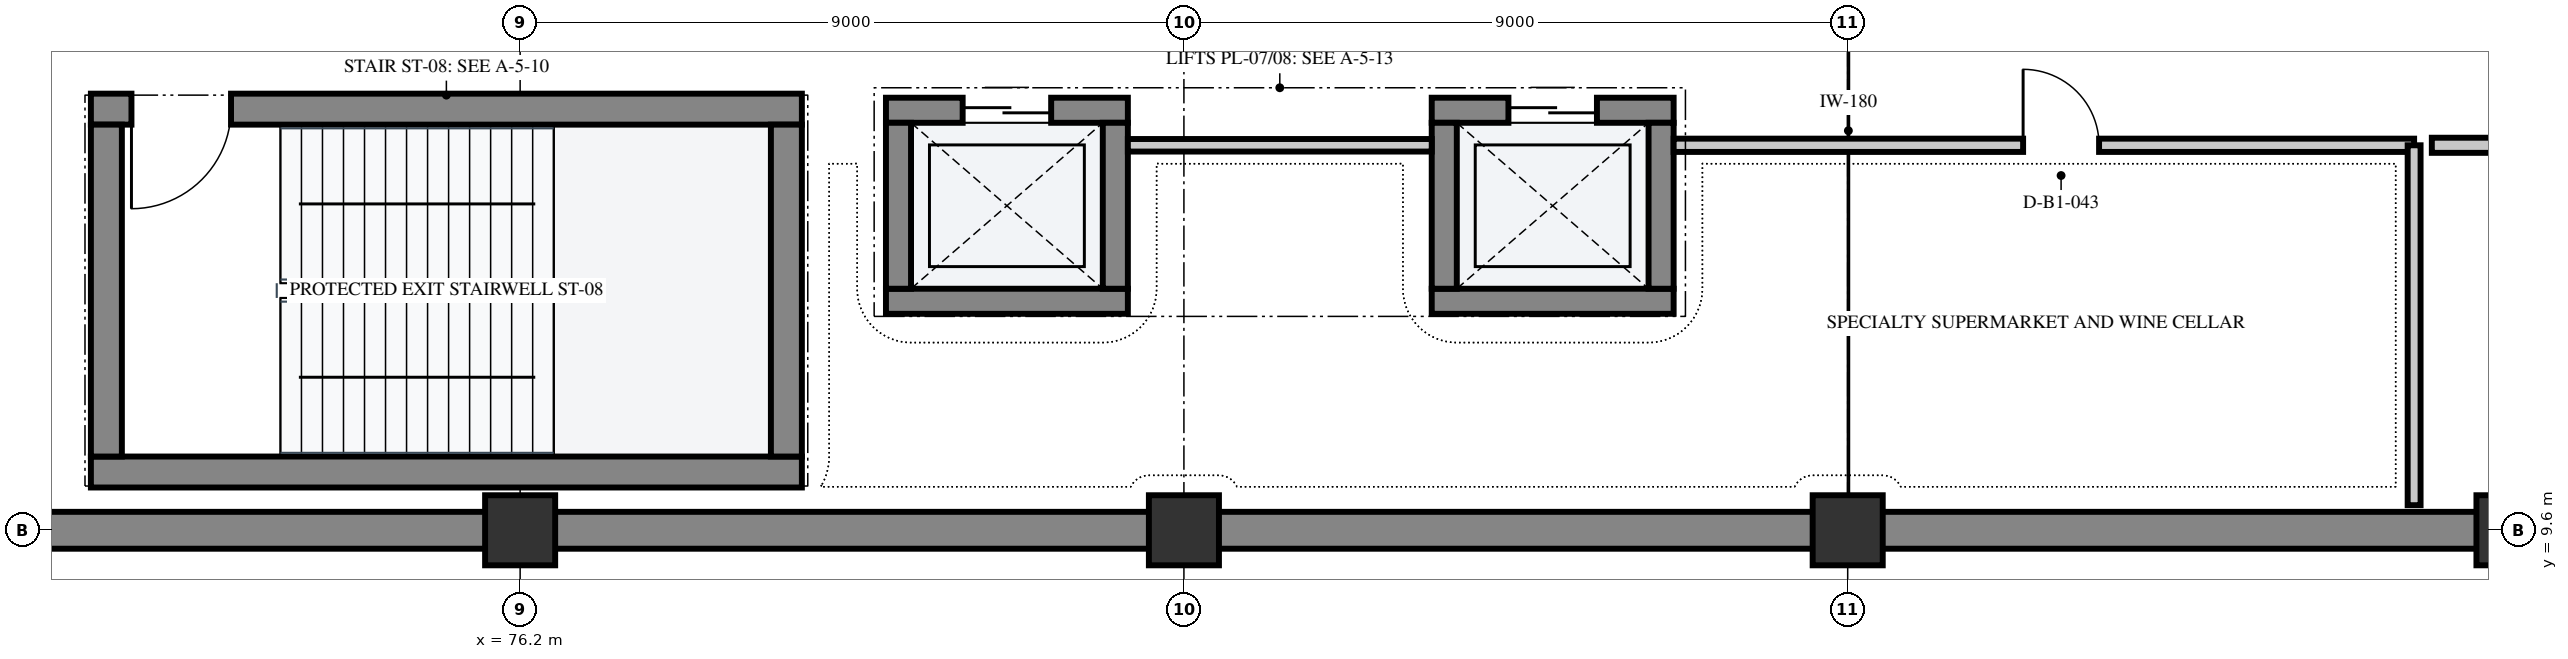
"""IFC4 building model, lengths in metres.
Left out: names, types, materials, properties, quantities, classifications, styles, units other than length and angle.
Written with IfcOpenShell. Run it as: python <this file> out.ifc"""

import sys

from ifc_helpers import new_model, si_unit, direction, frame, frame_2d, origin, origin_2d, place, context, subcontext, project, spatial, rectangle, extrude, element, fill, save


model = new_model("IFC4")
c1 = context("Model", 3, precision=1e-05, world=origin(), true_north=direction((0.0, 1.0)))
c2 = subcontext(c1, "Body", "Model", "MODEL_VIEW")
j1 = project(units=[si_unit("LENGTHUNIT", "METRE"), si_unit("PLANEANGLEUNIT", "RADIAN")], contexts=[c1])
p1 = place(None, origin())
s1 = spatial("IfcSite", under=j1, at=p1, CompositionType="ELEMENT")
p2 = place(p1, origin())
s2 = spatial("IfcBuilding", under=s1, at=p2, CompositionType="ELEMENT")
p3 = place(p2, frame((0.0, 0.0, -4.8)))
s3 = spatial("IfcBuildingStorey", under=s2, at=p3, CompositionType="ELEMENT", Elevation=-4.8)
for number, where, z_axis, x_axis in (
    (1, (85.2, 9.6, 0.0), (0.0, 0.0, 1.0), (1.0, 0.0, 0.0)),
    (2, (94.2, 9.6, 0.0), (0.0, 0.0, 1.0), (1.0, 0.0, 0.0)),
    (3, (103.2, 9.6, 0.0), (0.0, 0.0, 1.0), (1.0, 0.0, 0.0)),
    (4, (76.2, 9.6, 0.0), (0.0, 0.0, 1.0), (1.0, 0.0, 0.0)),
):
    element("IfcColumn", number, at=place(p3, frame(where, z_axis=z_axis, x_axis=x_axis)), inside=s3, PredefinedType="COLUMN", context=c2, shape_type="SweptSolid", body=[
        extrude(rectangle(XDim=0.95, YDim=0.95, at=origin_2d()), origin(), (0.0, 0.0, 1.0), 4.8),
    ])
p4 = place(p3, frame((106.2, 9.6, 0.0), z_axis=(0.0, 0.0, 1.0), x_axis=(-1.0, 0.0, 0.0)))
e5 = element("IfcWall", 5, at=p4, inside=s3, PredefinedType="USERDEFINED", context=c2, shape_type="SweptSolid", body=[
    extrude(rectangle(XDim=39.0, YDim=0.5, at=frame_2d((19.5, 0.0))), origin(), (0.0, 0.0, 1.0), 4.5),
])
p5 = place(p3, frame((70.38, 10.39, 0.0), z_axis=(0.0, 0.0, 1.0), x_axis=(1.0, 0.0, 0.0)))
e6 = element("IfcWall", 6, at=p5, inside=s3, PredefinedType="SHEAR", context=c2, shape_type="SweptSolid", body=[
    extrude(rectangle(XDim=9.64, YDim=0.42, at=frame_2d((4.82, 0.0))), origin(), (0.0, 0.0, 1.0), 4.5),
])
p6 = place(p3, frame((70.38, 15.31, 0.0), z_axis=(0.0, 0.0, 1.0), x_axis=(1.0, 0.0, 0.0)))
e7 = element("IfcWall", 7, at=p6, inside=s3, PredefinedType="SHEAR", context=c2, shape_type="SweptSolid", body=[
    extrude(rectangle(XDim=9.64, YDim=0.42, at=frame_2d((4.82, 0.0))), origin(), (0.0, 0.0, 1.0), 4.5),
])
p7 = place(p6, frame((0.55, 0.0, 0.0)))
e8 = element("IfcOpeningElement", 8, at=p7, cuts=e7, PredefinedType="OPENING", context=c2, shape_type="SweptSolid", body=[
    extrude(rectangle(XDim=1.35, YDim=2.2, at=frame_2d((0.675, 1.1))), frame((0.0, 0.222, 0.0), z_axis=(0.0, -1.0, 0.0), x_axis=(1.0, 0.0, 0.0)), (0.0, 0.0, 1.0), 0.444),
])
for number, where, z_axis, x_axis in (
    (9, (79.81, 10.6, 0.0), (0.0, 0.0, 1.0), (0.0, 1.0, 0.0)),
    (10, (70.59, 10.6, 0.0), (0.0, 0.0, 1.0), (0.0, 1.0, 0.0)),
):
    element("IfcWall", number, at=place(p3, frame(where, z_axis=z_axis, x_axis=x_axis)), inside=s3, PredefinedType="SHEAR", context=c2, shape_type="SweptSolid", body=[
        extrude(rectangle(XDim=4.5, YDim=0.42, at=frame_2d((2.25, 0.0))), origin(), (0.0, 0.0, 1.0), 4.5),
    ])
p8 = place(p3, frame((81.16, 12.705, 0.0), z_axis=(0.0, 0.0, 1.0), x_axis=(1.0, 0.0, 0.0)))
e11 = element("IfcWall", 11, at=p8, inside=s3, PredefinedType="SHEAR", context=c2, shape_type="SweptSolid", body=[
    extrude(rectangle(XDim=3.28, YDim=0.34, at=frame_2d((1.64, 0.0))), origin(), (0.0, 0.0, 1.0), 4.5),
])
p9 = place(p3, frame((81.16, 15.295, 0.0), z_axis=(0.0, 0.0, 1.0), x_axis=(1.0, 0.0, 0.0)))
e12 = element("IfcWall", 12, at=p9, inside=s3, PredefinedType="SHEAR", context=c2, shape_type="SweptSolid", body=[
    extrude(rectangle(XDim=3.28, YDim=0.34, at=frame_2d((1.64, 0.0))), origin(), (0.0, 0.0, 1.0), 4.5),
])
p10 = place(p9, frame((1.04, 0.0, 0.0)))
e13 = element("IfcOpeningElement", 13, at=p10, cuts=e12, PredefinedType="OPENING", context=c2, shape_type="SweptSolid", body=[
    extrude(rectangle(XDim=1.2, YDim=2.2, at=frame_2d((0.6, 1.1))), frame((0.0, 0.182, 0.0), z_axis=(0.0, -1.0, 0.0), x_axis=(1.0, 0.0, 0.0)), (0.0, 0.0, 1.0), 0.364),
])
for number, where, z_axis, x_axis in (
    (14, (81.33, 12.875, 0.0), (0.0, 0.0, 1.0), (0.0, 1.0, 0.0)),
    (15, (84.27, 12.875, 0.0), (0.0, 0.0, 1.0), (0.0, 1.0, 0.0)),
):
    element("IfcWall", number, at=place(p3, frame(where, z_axis=z_axis, x_axis=x_axis)), inside=s3, PredefinedType="SHEAR", context=c2, shape_type="SweptSolid", body=[
        extrude(rectangle(XDim=2.25, YDim=0.34, at=frame_2d((1.125, 0.0))), origin(), (0.0, 0.0, 1.0), 4.5),
    ])
p11 = place(p3, frame((88.56, 12.705, 0.0), z_axis=(0.0, 0.0, 1.0), x_axis=(1.0, 0.0, 0.0)))
e16 = element("IfcWall", 16, at=p11, inside=s3, PredefinedType="SHEAR", context=c2, shape_type="SweptSolid", body=[
    extrude(rectangle(XDim=3.28, YDim=0.34, at=frame_2d((1.64, 0.0))), origin(), (0.0, 0.0, 1.0), 4.5),
])
p12 = place(p3, frame((88.56, 15.295, 0.0), z_axis=(0.0, 0.0, 1.0), x_axis=(1.0, 0.0, 0.0)))
e17 = element("IfcWall", 17, at=p12, inside=s3, PredefinedType="SHEAR", context=c2, shape_type="SweptSolid", body=[
    extrude(rectangle(XDim=3.28, YDim=0.34, at=frame_2d((1.64, 0.0))), origin(), (0.0, 0.0, 1.0), 4.5),
])
p13 = place(p12, frame((1.04, 0.0, 0.0)))
e18 = element("IfcOpeningElement", 18, at=p13, cuts=e17, PredefinedType="OPENING", context=c2, shape_type="SweptSolid", body=[
    extrude(rectangle(XDim=1.2, YDim=2.2, at=frame_2d((0.6, 1.1))), frame((0.0, 0.182, 0.0), z_axis=(0.0, -1.0, 0.0), x_axis=(1.0, 0.0, 0.0)), (0.0, 0.0, 1.0), 0.364),
])
for number, where, z_axis, x_axis in (
    (19, (88.73, 12.875, 0.0), (0.0, 0.0, 1.0), (0.0, 1.0, 0.0)),
    (20, (91.67, 12.875, 0.0), (0.0, 0.0, 1.0), (0.0, 1.0, 0.0)),
):
    element("IfcWall", number, at=place(p3, frame(where, z_axis=z_axis, x_axis=x_axis)), inside=s3, PredefinedType="SHEAR", context=c2, shape_type="SweptSolid", body=[
        extrude(rectangle(XDim=2.25, YDim=0.34, at=frame_2d((1.125, 0.0))), origin(), (0.0, 0.0, 1.0), 4.5),
    ])
p14 = place(p3, frame((91.84, 14.82, 0.0), z_axis=(0.0, 0.0, 1.0), x_axis=(1.0, 0.0, 0.0)))
e21 = element("IfcWall", 21, at=p14, inside=s3, PredefinedType="PARTITIONING", context=c2, shape_type="SweptSolid", body=[
    extrude(rectangle(XDim=10.04, YDim=0.18, at=frame_2d((5.02, 0.0))), origin(), (0.0, 0.0, 1.0), 3.44),
])
p15 = place(p14, frame((4.738, 0.0, 0.0)))
e22 = element("IfcOpeningElement", 22, at=p15, cuts=e21, PredefinedType="OPENING", context=c2, shape_type="SweptSolid", body=[
    extrude(rectangle(XDim=1.03, YDim=2.16, at=frame_2d((0.515, 1.08))), frame((0.0, 0.102, 0.0), z_axis=(0.0, -1.0, 0.0), x_axis=(1.0, 0.0, 0.0)), (0.0, 0.0, 1.0), 0.204),
])
p16 = place(p3, frame((101.88, 14.82, 0.0), z_axis=(0.0, 0.0, 1.0), x_axis=(0.0, -1.0, 0.0)))
e23 = element("IfcWall", 23, at=p16, inside=s3, PredefinedType="PARTITIONING", context=c2, shape_type="SweptSolid", body=[
    extrude(rectangle(XDim=4.88, YDim=0.175, at=frame_2d((2.44, 0.0))), origin(), (0.0, 0.0, 1.0), 4.5),
])
p17 = place(p3, frame((84.44, 14.82, 0.0), z_axis=(0.0, 0.0, 1.0), x_axis=(1.0, 0.0, 0.0)))
e24 = element("IfcWall", 24, at=p17, inside=s3, PredefinedType="PARTITIONING", context=c2, shape_type="SweptSolid", body=[
    extrude(rectangle(XDim=4.12, YDim=0.17, at=frame_2d((2.06, 0.0))), origin(), (0.0, 0.0, 1.0), 3.44),
])
p18 = place(p3, frame((102.12, 14.82, 0.0), z_axis=(0.0, 0.0, 1.0), x_axis=(1.0, 0.0, 0.0)))
e25 = element("IfcWall", 25, at=p18, inside=s3, PredefinedType="PARTITIONING", context=c2, shape_type="SweptSolid", body=[
    extrude(rectangle(XDim=14.959, YDim=0.205, at=frame_2d((7.479, 0.0))), origin(), (0.0, 0.0, 1.0), 3.44),
])
p19 = place(p18, frame((7.005, 0.0, 0.0)))
e26 = element("IfcOpeningElement", 26, at=p19, cuts=e25, PredefinedType="OPENING", context=c2, shape_type="SweptSolid", body=[
    extrude(rectangle(XDim=0.95, YDim=2.1, at=frame_2d((0.475, 1.05))), frame((0.0, 0.115, 0.0), z_axis=(0.0, -1.0, 0.0), x_axis=(1.0, 0.0, 0.0)), (0.0, 0.0, 1.0), 0.229),
])
p20 = place(p7, frame((1.35, 0.0, 0.0), z_axis=(0.0, 0.0, 1.0), x_axis=(-1.0, 0.0, 0.0)))
e27 = element("IfcDoor", 27, at=p20, inside=s3, OperationType="SINGLE_SWING_RIGHT", PredefinedType="DOOR", context=c2, shape_type="SweptSolid", body=[
    extrude(rectangle(XDim=1.35, YDim=2.2, at=frame_2d((0.675, 1.1))), frame((0.0, 0.025, 0.0), z_axis=(0.0, -1.0, 0.0), x_axis=(1.0, 0.0, 0.0)), (0.0, 0.0, 1.0), 0.05),
])
fill(e8, e27)
p21 = place(p10, origin())
e28 = element("IfcDoor", 28, at=p21, inside=s3, OperationType="DOUBLE_DOOR_SLIDING", PredefinedType="DOOR", context=c2, shape_type="SweptSolid", body=[
    extrude(rectangle(XDim=1.2, YDim=2.2, at=frame_2d((0.6, 1.1))), frame((0.0, 0.025, 0.0), z_axis=(0.0, -1.0, 0.0), x_axis=(1.0, 0.0, 0.0)), (0.0, 0.0, 1.0), 0.05),
])
fill(e13, e28)
p22 = place(p13, origin())
e29 = element("IfcDoor", 29, at=p22, inside=s3, OperationType="DOUBLE_DOOR_SLIDING", PredefinedType="DOOR", context=c2, shape_type="SweptSolid", body=[
    extrude(rectangle(XDim=1.2, YDim=2.2, at=frame_2d((0.6, 1.1))), frame((0.0, 0.025, 0.0), z_axis=(0.0, -1.0, 0.0), x_axis=(1.0, 0.0, 0.0)), (0.0, 0.0, 1.0), 0.05),
])
fill(e18, e29)
p23 = place(p15, origin())
e30 = element("IfcDoor", 30, at=p23, inside=s3, OperationType="SINGLE_SWING_LEFT", PredefinedType="DOOR", context=c2, shape_type="SweptSolid", body=[
    extrude(rectangle(XDim=1.03, YDim=2.16, at=frame_2d((0.515, 1.08))), frame((0.0, 0.025, 0.0), z_axis=(0.0, -1.0, 0.0), x_axis=(1.0, 0.0, 0.0)), (0.0, 0.0, 1.0), 0.05),
])
fill(e22, e30)
save(model, sys.argv[1])
